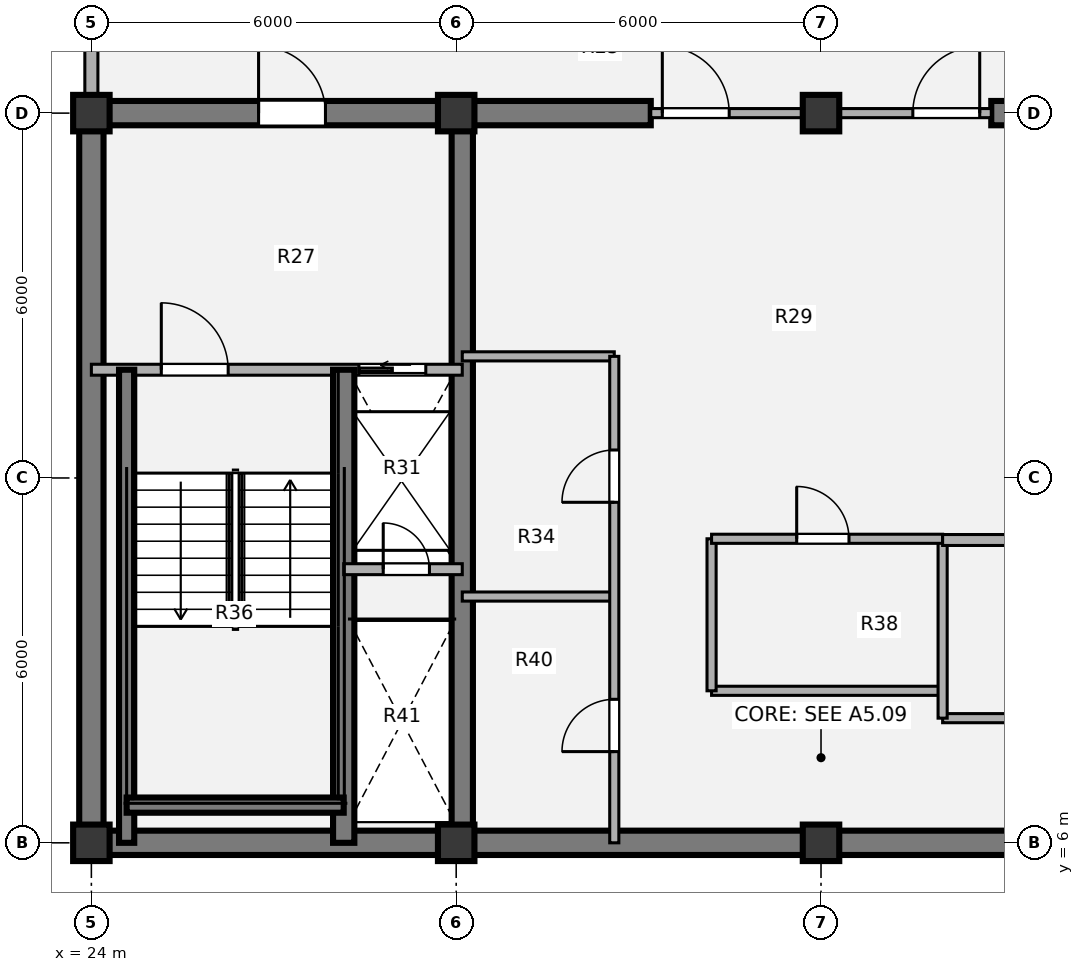
"""IFC4 building model, lengths in metres.
Left out: names, types, materials, properties, quantities, classifications, styles, units other than length and angle.
Written with IfcOpenShell. Run it as: python <this file> out.ifc"""

import sys

from ifc_helpers import new_model, si_unit, direction, frame, frame_2d, origin, origin_2d, place, context, subcontext, project, spatial, rectangle, extrude, source, transform, mapped, element, fill, save


model = new_model("IFC4")
c1 = context("Model", 3, precision=1e-05, world=origin(), true_north=direction((0.0, 1.0)))
c2 = subcontext(c1, "Body", "Model", "MODEL_VIEW")
j1 = project(units=[si_unit("LENGTHUNIT", "METRE"), si_unit("PLANEANGLEUNIT", "RADIAN")], contexts=[c1])
p1 = place(None, origin())
s1 = spatial("IfcSite", under=j1, at=p1, CompositionType="ELEMENT")
p2 = place(p1, origin())
s2 = spatial("IfcBuilding", under=s1, at=p2, CompositionType="ELEMENT")
p3 = place(p2, frame((0.0, 0.0, 260.82)))
s3 = spatial("IfcBuildingStorey", under=s2, at=p3, CompositionType="ELEMENT", Elevation=260.82)
m1 = source(origin(), c2, "Body", "SweptSolid", [
    extrude(rectangle(XDim=0.6, YDim=0.6, at=origin_2d()), origin(), (0.0, 0.0, 1.0), 3.78),
])
for number, where, z_axis, x_axis in (
    (1, (24.0, 6.0, 0.0), (0.0, 0.0, 1.0), (1.0, 0.0, 0.0)),
    (2, (30.0, 6.0, 0.0), (0.0, 0.0, 1.0), (1.0, 0.0, 0.0)),
    (3, (36.0, 6.0, 0.0), (0.0, 0.0, 1.0), (1.0, 0.0, 0.0)),
    (4, (24.0, 18.0, 0.0), (0.0, 0.0, 1.0), (1.0, 0.0, 0.0)),
    (5, (30.0, 18.0, 0.0), (0.0, 0.0, 1.0), (1.0, 0.0, 0.0)),
    (6, (36.0, 18.0, 0.0), (0.0, 0.0, 1.0), (1.0, 0.0, 0.0)),
):
    element("IfcColumn", number, at=place(p3, frame(where, z_axis=z_axis, x_axis=x_axis)), inside=s3, PredefinedType="COLUMN", context=c2, shape_type="MappedRepresentation", body=[
        mapped(m1, transform((0.0, 0.0, 0.0), x_axis=(1.0, 0.0, 0.0), y_axis=(0.0, 1.0, 0.0), z_axis=(0.0, 0.0, 1.0), scale=1.0)),
    ])
p4 = place(p3, frame((48.2, 6.0, 0.0), z_axis=(0.0, 0.0, 1.0), x_axis=(-1.0, 0.0, 0.0)))
e7 = element("IfcWall", 7, at=p4, inside=s3, PredefinedType="SHEAR", context=c2, shape_type="SweptSolid", body=[
    extrude(rectangle(XDim=24.4, YDim=0.4, at=frame_2d((12.2, 0.0))), origin(), (0.0, 0.0, 1.0), 3.78),
])
p5 = place(p3, frame((24.0, 6.0, 0.0), z_axis=(0.0, 0.0, 1.0), x_axis=(0.0, 1.0, 0.0)))
e8 = element("IfcWall", 8, at=p5, inside=s3, PredefinedType="SHEAR", context=c2, shape_type="SweptSolid", body=[
    extrude(rectangle(XDim=12.0, YDim=0.4, at=frame_2d((6.0, 0.0))), origin(), (0.0, 0.0, 1.0), 3.78),
])
p6 = place(p3, frame((23.8, 18.0, 0.0), z_axis=(0.0, 0.0, 1.0), x_axis=(1.0, 0.0, 0.0)))
e9 = element("IfcWall", 9, at=p6, inside=s3, PredefinedType="SHEAR", context=c2, shape_type="SweptSolid", body=[
    extrude(rectangle(XDim=9.4, YDim=0.4, at=frame_2d((4.7, 0.0))), origin(), (0.0, 0.0, 1.0), 3.78),
])
p7 = place(p6, frame((2.95, 0.0, 0.0)))
e10 = element("IfcOpeningElement", 10, at=p7, cuts=e9, PredefinedType="OPENING", context=c2, shape_type="SweptSolid", body=[
    extrude(rectangle(XDim=1.1, YDim=2.1, at=origin_2d()), frame((0.55, 0.21, 1.05), z_axis=(0.0, -1.0, 0.0), x_axis=(1.0, 0.0, 0.0)), (0.0, 0.0, 1.0), 0.42),
])
p8 = place(p3, frame((38.8, 18.0, 0.0), z_axis=(0.0, 0.0, 1.0), x_axis=(1.0, 0.0, 0.0)))
e11 = element("IfcWall", 11, at=p8, inside=s3, PredefinedType="SHEAR", context=c2, shape_type="SweptSolid", body=[
    extrude(rectangle(XDim=9.4, YDim=0.4, at=frame_2d((4.7, 0.0))), origin(), (0.0, 0.0, 1.0), 3.78),
])
p9 = place(p8, frame((5.45, 0.0, 0.0)))
e12 = element("IfcOpeningElement", 12, at=p9, cuts=e11, PredefinedType="OPENING", context=c2, shape_type="SweptSolid", body=[
    extrude(rectangle(XDim=1.1, YDim=2.1, at=origin_2d()), frame((0.55, 0.21, 1.05), z_axis=(0.0, -1.0, 0.0), x_axis=(1.0, 0.0, 0.0)), (0.0, 0.0, 1.0), 0.42),
])
p10 = place(p3, frame((30.1, 6.0, 0.0), z_axis=(0.0, 0.0, 1.0), x_axis=(0.0, 1.0, 0.0)))
e13 = element("IfcWall", 13, at=p10, inside=s3, PredefinedType="SHEAR", context=c2, shape_type="SweptSolid", body=[
    extrude(rectangle(XDim=12.0, YDim=0.35, at=frame_2d((6.0, 0.0))), origin(), (0.0, 0.0, 1.0), 3.78),
])
p11 = place(p3, frame((24.0, 18.28, 0.0), z_axis=(0.0, 0.0, 1.0), x_axis=(0.0, 1.0, 0.0)))
e14 = element("IfcWall", 14, at=p11, inside=s3, PredefinedType="SOLIDWALL", context=c2, shape_type="SweptSolid", body=[
    extrude(rectangle(XDim=2.77, YDim=0.215, at=frame_2d((1.385, 0.0))), origin(), (0.0, 0.0, 1.0), 2.718),
])
p12 = place(p3, frame((30.1, 14.0, 0.0), z_axis=(0.0, 0.0, 1.0), x_axis=(1.0, 0.0, 0.0)))
e15 = element("IfcWall", 15, at=p12, inside=s3, PredefinedType="PARTITIONING", context=c2, shape_type="SweptSolid", body=[
    extrude(rectangle(XDim=2.5, YDim=0.15, at=frame_2d((1.25, 0.0))), origin(), (0.0, 0.0, 1.0), 3.5),
])
p13 = place(p3, frame((34.2, 8.5, 0.0), z_axis=(0.0, 0.0, 1.0), x_axis=(1.0, 0.0, 0.0)))
e16 = element("IfcWall", 16, at=p13, inside=s3, PredefinedType="PARTITIONING", context=c2, shape_type="SweptSolid", body=[
    extrude(rectangle(XDim=3.8, YDim=0.15, at=frame_2d((1.9, 0.0))), origin(), (0.0, 0.0, 1.0), 3.5),
])
p14 = place(p3, frame((38.0, 8.05, 0.0), z_axis=(0.0, 0.0, 1.0), x_axis=(1.0, 0.0, 0.0)))
e17 = element("IfcWall", 17, at=p14, inside=s3, PredefinedType="PARTITIONING", context=c2, shape_type="SweptSolid", body=[
    extrude(rectangle(XDim=3.9, YDim=0.15, at=frame_2d((1.95, 0.0))), origin(), (0.0, 0.0, 1.0), 3.5),
])
p15 = place(p14, frame((1.45, 0.0, 0.0)))
e18 = element("IfcOpeningElement", 18, at=p15, cuts=e17, PredefinedType="OPENING", context=c2, shape_type="SweptSolid", body=[
    extrude(rectangle(XDim=0.86, YDim=2.1, at=origin_2d()), frame((0.43, 0.085, 1.05), z_axis=(0.0, -1.0, 0.0), x_axis=(1.0, 0.0, 0.0)), (0.0, 0.0, 1.0), 0.17),
])
p16 = place(p3, frame((34.2, 8.5, 0.0), z_axis=(0.0, 0.0, 1.0), x_axis=(0.0, 1.0, 0.0)))
e19 = element("IfcWall", 19, at=p16, inside=s3, PredefinedType="PARTITIONING", context=c2, shape_type="SweptSolid", body=[
    extrude(rectangle(XDim=2.5, YDim=0.15, at=frame_2d((1.25, 0.0))), origin(), (0.0, 0.0, 1.0), 3.5),
])
p17 = place(p3, frame((38.0, 8.05, 0.0), z_axis=(0.0, 0.0, 1.0), x_axis=(0.0, 1.0, 0.0)))
e20 = element("IfcWall", 20, at=p17, inside=s3, PredefinedType="PARTITIONING", context=c2, shape_type="SweptSolid", body=[
    extrude(rectangle(XDim=2.95, YDim=0.15, at=frame_2d((1.475, 0.0))), origin(), (0.0, 0.0, 1.0), 3.5),
])
p18 = place(p3, frame((34.2, 11.0, 0.0), z_axis=(0.0, 0.0, 1.0), x_axis=(1.0, 0.0, 0.0)))
e21 = element("IfcWall", 21, at=p18, inside=s3, PredefinedType="PARTITIONING", context=c2, shape_type="SweptSolid", body=[
    extrude(rectangle(XDim=3.8, YDim=0.15, at=frame_2d((1.9, 0.0))), origin(), (0.0, 0.0, 1.0), 3.5),
])
p19 = place(p18, frame((1.4, 0.0, 0.0)))
e22 = element("IfcOpeningElement", 22, at=p19, cuts=e21, PredefinedType="OPENING", context=c2, shape_type="SweptSolid", body=[
    extrude(rectangle(XDim=0.86, YDim=2.1, at=origin_2d()), frame((0.43, 0.085, 1.05), z_axis=(0.0, -1.0, 0.0), x_axis=(1.0, 0.0, 0.0)), (0.0, 0.0, 1.0), 0.17),
])
p20 = place(p3, frame((38.0, 10.98, 0.0), z_axis=(0.0, 0.0, 1.0), x_axis=(1.0, 0.0, 0.0)))
e23 = element("IfcWall", 23, at=p20, inside=s3, PredefinedType="PARTITIONING", context=c2, shape_type="SweptSolid", body=[
    extrude(rectangle(XDim=3.9, YDim=0.18, at=frame_2d((1.95, 0.0))), origin(), (0.0, 0.0, 1.0), 3.5),
])
p21 = place(p3, frame((30.1, 10.05, 0.0), z_axis=(0.0, 0.0, 1.0), x_axis=(1.0, 0.0, 0.0)))
e24 = element("IfcWall", 24, at=p21, inside=s3, PredefinedType="PARTITIONING", context=c2, shape_type="SweptSolid", body=[
    extrude(rectangle(XDim=2.5, YDim=0.15, at=frame_2d((1.25, 0.0))), origin(), (0.0, 0.0, 1.0), 3.5),
])
p22 = place(p3, frame((32.6, 6.0, 0.0), z_axis=(0.0, 0.0, 1.0), x_axis=(0.0, 1.0, 0.0)))
e25 = element("IfcWall", 25, at=p22, inside=s3, PredefinedType="PARTITIONING", context=c2, shape_type="SweptSolid", body=[
    extrude(rectangle(XDim=8.0, YDim=0.15, at=frame_2d((4.0, 0.0))), origin(), (0.0, 0.0, 1.0), 3.5),
])
p23 = place(p22, frame((1.5, 0.0, 0.0)))
e26 = element("IfcOpeningElement", 26, at=p23, cuts=e25, PredefinedType="OPENING", context=c2, shape_type="SweptSolid", body=[
    extrude(rectangle(XDim=0.86, YDim=2.1, at=origin_2d()), frame((0.43, 0.085, 1.05), z_axis=(0.0, -1.0, 0.0), x_axis=(1.0, 0.0, 0.0)), (0.0, 0.0, 1.0), 0.17),
])
p24 = place(p22, frame((5.6, 0.0, 0.0)))
e27 = element("IfcOpeningElement", 27, at=p24, cuts=e25, PredefinedType="OPENING", context=c2, shape_type="SweptSolid", body=[
    extrude(rectangle(XDim=0.86, YDim=2.1, at=origin_2d()), frame((0.43, 0.085, 1.05), z_axis=(0.0, -1.0, 0.0), x_axis=(1.0, 0.0, 0.0)), (0.0, 0.0, 1.0), 0.17),
])
p25 = place(p3, frame((33.2, 18.0, 0.0), z_axis=(0.0, 0.0, 1.0), x_axis=(1.0, 0.0, 0.0)))
e28 = element("IfcWall", 28, at=p25, inside=s3, PredefinedType="PARTITIONING", context=c2, shape_type="SweptSolid", body=[
    extrude(rectangle(XDim=5.6, YDim=0.15, at=frame_2d((2.8, 0.0))), origin(), (0.0, 0.0, 1.0), 2.515),
])
p26 = place(p25, frame((0.19, 0.0, 0.0)))
e29 = element("IfcOpeningElement", 29, at=p26, cuts=e28, PredefinedType="OPENING", context=c2, shape_type="SweptSolid", body=[
    extrude(rectangle(XDim=1.1, YDim=2.1, at=origin_2d()), frame((0.55, 0.085, 1.05), z_axis=(0.0, -1.0, 0.0), x_axis=(1.0, 0.0, 0.0)), (0.0, 0.0, 1.0), 0.17),
])
p27 = place(p25, frame((4.31, 0.0, 0.0)))
e30 = element("IfcOpeningElement", 30, at=p27, cuts=e28, PredefinedType="OPENING", context=c2, shape_type="SweptSolid", body=[
    extrude(rectangle(XDim=1.1, YDim=2.1, at=origin_2d()), frame((0.55, 0.085, 1.05), z_axis=(0.0, -1.0, 0.0), x_axis=(1.0, 0.0, 0.0)), (0.0, 0.0, 1.0), 0.17),
])
p28 = place(p3, frame((24.0, 13.78, 0.0), z_axis=(0.0, 0.0, 1.0), x_axis=(1.0, 0.0, 0.0)))
e31 = element("IfcWall", 31, at=p28, inside=s3, PredefinedType="PARTITIONING", context=c2, shape_type="SweptSolid", body=[
    extrude(rectangle(XDim=6.1, YDim=0.18, at=frame_2d((3.05, 0.0))), origin(), (0.0, 0.0, 1.0), 3.5),
])
p29 = place(p28, frame((1.15, 0.0, 0.0)))
e32 = element("IfcOpeningElement", 32, at=p29, cuts=e31, PredefinedType="OPENING", context=c2, shape_type="SweptSolid", body=[
    extrude(rectangle(XDim=1.1, YDim=2.1, at=origin_2d()), frame((0.55, 0.1, 1.05), z_axis=(0.0, -1.0, 0.0), x_axis=(1.0, 0.0, 0.0)), (0.0, 0.0, 1.0), 0.2),
])
p30 = place(p28, frame((4.4, 0.0, 0.0)))
e33 = element("IfcOpeningElement", 33, at=p30, cuts=e31, PredefinedType="OPENING", context=c2, shape_type="SweptSolid", body=[
    extrude(rectangle(XDim=1.1, YDim=2.1, at=origin_2d()), frame((0.55, 0.1, 1.05), z_axis=(0.0, -1.0, 0.0), x_axis=(1.0, 0.0, 0.0)), (0.0, 0.0, 1.0), 0.2),
])
p31 = place(p3, frame((28.15, 6.0, 0.0), z_axis=(0.0, 0.0, 1.0), x_axis=(0.0, 1.0, 0.0)))
e34 = element("IfcWall", 34, at=p31, inside=s3, PredefinedType="SHEAR", context=c2, shape_type="SweptSolid", body=[
    extrude(rectangle(XDim=7.78, YDim=0.35, at=frame_2d((3.89, 0.0))), origin(), (0.0, 0.0, 1.0), 3.85),
])
p32 = place(p3, frame((24.58, 6.0, 0.0), z_axis=(0.0, 0.0, 1.0), x_axis=(0.0, 1.0, 0.0)))
e35 = element("IfcWall", 35, at=p32, inside=s3, PredefinedType="SHEAR", context=c2, shape_type="SweptSolid", body=[
    extrude(rectangle(XDim=7.78, YDim=0.25, at=frame_2d((3.89, 0.0))), origin(), (0.0, 0.0, 1.0), 3.85),
])
p33 = place(p3, frame((24.58, 6.62, 0.0), z_axis=(0.0, 0.0, 1.0), x_axis=(1.0, 0.0, 0.0)))
e36 = element("IfcWall", 36, at=p33, inside=s3, PredefinedType="SHEAR", context=c2, shape_type="SweptSolid", body=[
    extrude(rectangle(XDim=3.57, YDim=0.25, at=frame_2d((1.785, 0.0))), origin(), (0.0, 0.0, 1.0), 3.85),
])
p34 = place(p3, frame((28.15, 10.5, 0.0), z_axis=(0.0, 0.0, 1.0), x_axis=(1.0, 0.0, 0.0)))
e37 = element("IfcWall", 37, at=p34, inside=s3, PredefinedType="PARTITIONING", context=c2, shape_type="SweptSolid", body=[
    extrude(rectangle(XDim=1.95, YDim=0.18, at=frame_2d((0.975, 0.0))), origin(), (0.0, 0.0, 1.0), 3.5),
])
p35 = place(p34, frame((0.65, 0.0, 0.0)))
e38 = element("IfcOpeningElement", 38, at=p35, cuts=e37, PredefinedType="OPENING", context=c2, shape_type="SweptSolid", body=[
    extrude(rectangle(XDim=0.76, YDim=2.05, at=origin_2d()), frame((0.38, 0.1, 1.025), z_axis=(0.0, -1.0, 0.0), x_axis=(1.0, 0.0, 0.0)), (0.0, 0.0, 1.0), 0.2),
])
m2 = source(origin(), c2, "Body", "SweptSolid", [
    extrude(rectangle(XDim=0.86, YDim=2.1, at=origin_2d()), frame((0.43, 0.025, 1.05), z_axis=(0.0, -1.0, 0.0), x_axis=(1.0, 0.0, 0.0)), (0.0, 0.0, 1.0), 0.05),
])
p36 = place(p19, origin())
e39 = element("IfcDoor", 39, at=p36, inside=s3, OperationType="SINGLE_SWING_LEFT", PredefinedType="DOOR", context=c2, shape_type="MappedRepresentation", body=[
    mapped(m2, transform((0.0, 0.0, 0.0), x_axis=(1.0, 0.0, 0.0), y_axis=(0.0, 1.0, 0.0), z_axis=(0.0, 0.0, 1.0), scale=1.0)),
])
fill(e22, e39)
p37 = place(p23, origin())
e40 = element("IfcDoor", 40, at=p37, inside=s3, OperationType="SINGLE_SWING_LEFT", PredefinedType="DOOR", context=c2, shape_type="MappedRepresentation", body=[
    mapped(m2, transform((0.0, 0.0, 0.0), x_axis=(1.0, 0.0, 0.0), y_axis=(0.0, 1.0, 0.0), z_axis=(0.0, 0.0, 1.0), scale=1.0)),
])
fill(e26, e40)
p38 = place(p24, origin())
e41 = element("IfcDoor", 41, at=p38, inside=s3, OperationType="SINGLE_SWING_LEFT", PredefinedType="DOOR", context=c2, shape_type="MappedRepresentation", body=[
    mapped(m2, transform((0.0, 0.0, 0.0), x_axis=(1.0, 0.0, 0.0), y_axis=(0.0, 1.0, 0.0), z_axis=(0.0, 0.0, 1.0), scale=1.0)),
])
fill(e27, e41)
m3 = source(origin(), c2, "Body", "SweptSolid", [
    extrude(rectangle(XDim=1.1, YDim=2.1, at=origin_2d()), frame((0.55, 0.025, 1.05), z_axis=(0.0, -1.0, 0.0), x_axis=(1.0, 0.0, 0.0)), (0.0, 0.0, 1.0), 0.05),
])
p39 = place(p26, origin())
e42 = element("IfcDoor", 42, at=p39, inside=s3, OperationType="SINGLE_SWING_LEFT", PredefinedType="DOOR", context=c2, shape_type="MappedRepresentation", body=[
    mapped(m3, transform((0.0, 0.0, 0.0), x_axis=(1.0, 0.0, 0.0), y_axis=(0.0, 1.0, 0.0), z_axis=(0.0, 0.0, 1.0), scale=1.0)),
])
fill(e29, e42)
p40 = place(p27, origin())
e43 = element("IfcDoor", 43, at=p40, inside=s3, OperationType="SINGLE_SWING_RIGHT", PredefinedType="DOOR", context=c2, shape_type="MappedRepresentation", body=[
    mapped(m3, transform((0.0, 0.0, 0.0), x_axis=(1.0, 0.0, 0.0), y_axis=(0.0, 1.0, 0.0), z_axis=(0.0, 0.0, 1.0), scale=1.0)),
])
fill(e30, e43)
m4 = source(origin(), c2, "Body", "SweptSolid", [
    extrude(rectangle(XDim=1.1, YDim=2.1, at=origin_2d()), frame((0.55, 0.025, 1.05), z_axis=(0.0, -1.0, 0.0), x_axis=(1.0, 0.0, 0.0)), (0.0, 0.0, 1.0), 0.05),
])
p41 = place(p29, origin())
e44 = element("IfcDoor", 44, at=p41, inside=s3, OperationType="SINGLE_SWING_LEFT", PredefinedType="DOOR", context=c2, shape_type="MappedRepresentation", body=[
    mapped(m4, transform((0.0, 0.0, 0.0), x_axis=(1.0, 0.0, 0.0), y_axis=(0.0, 1.0, 0.0), z_axis=(0.0, 0.0, 1.0), scale=1.0)),
])
fill(e32, e44)
m5 = source(origin(), c2, "Body", "SweptSolid", [
    extrude(rectangle(XDim=1.1, YDim=2.1, at=origin_2d()), frame((0.55, 0.025, 1.05), z_axis=(0.0, -1.0, 0.0), x_axis=(1.0, 0.0, 0.0)), (0.0, 0.0, 1.0), 0.05),
])
p42 = place(p30, origin())
e45 = element("IfcDoor", 45, at=p42, inside=s3, OperationType="SLIDING_TO_LEFT", PredefinedType="DOOR", context=c2, shape_type="MappedRepresentation", body=[
    mapped(m5, transform((0.0, 0.0, 0.0), x_axis=(1.0, 0.0, 0.0), y_axis=(0.0, 1.0, 0.0), z_axis=(0.0, 0.0, 1.0), scale=1.0)),
])
fill(e33, e45)
m6 = source(origin(), c2, "Body", "SweptSolid", [
    extrude(rectangle(XDim=0.76, YDim=2.05, at=origin_2d()), frame((0.38, 0.025, 1.025), z_axis=(0.0, -1.0, 0.0), x_axis=(1.0, 0.0, 0.0)), (0.0, 0.0, 1.0), 0.05),
])
p43 = place(p35, origin())
e46 = element("IfcDoor", 46, at=p43, inside=s3, OperationType="SINGLE_SWING_LEFT", PredefinedType="DOOR", context=c2, shape_type="MappedRepresentation", body=[
    mapped(m6, transform((0.0, 0.0, 0.0), x_axis=(1.0, 0.0, 0.0), y_axis=(0.0, 1.0, 0.0), z_axis=(0.0, 0.0, 1.0), scale=1.0)),
])
fill(e38, e46)
p44 = place(p7, origin())
e47 = element("IfcDoor", 47, at=p44, inside=s3, OperationType="SINGLE_SWING_LEFT", PredefinedType="DOOR", context=c2, shape_type="MappedRepresentation", body=[
    mapped(m3, transform((0.0, 0.0, 0.0), x_axis=(1.0, 0.0, 0.0), y_axis=(0.0, 1.0, 0.0), z_axis=(0.0, 0.0, 1.0), scale=1.0)),
])
fill(e10, e47)
save(model, sys.argv[1])
